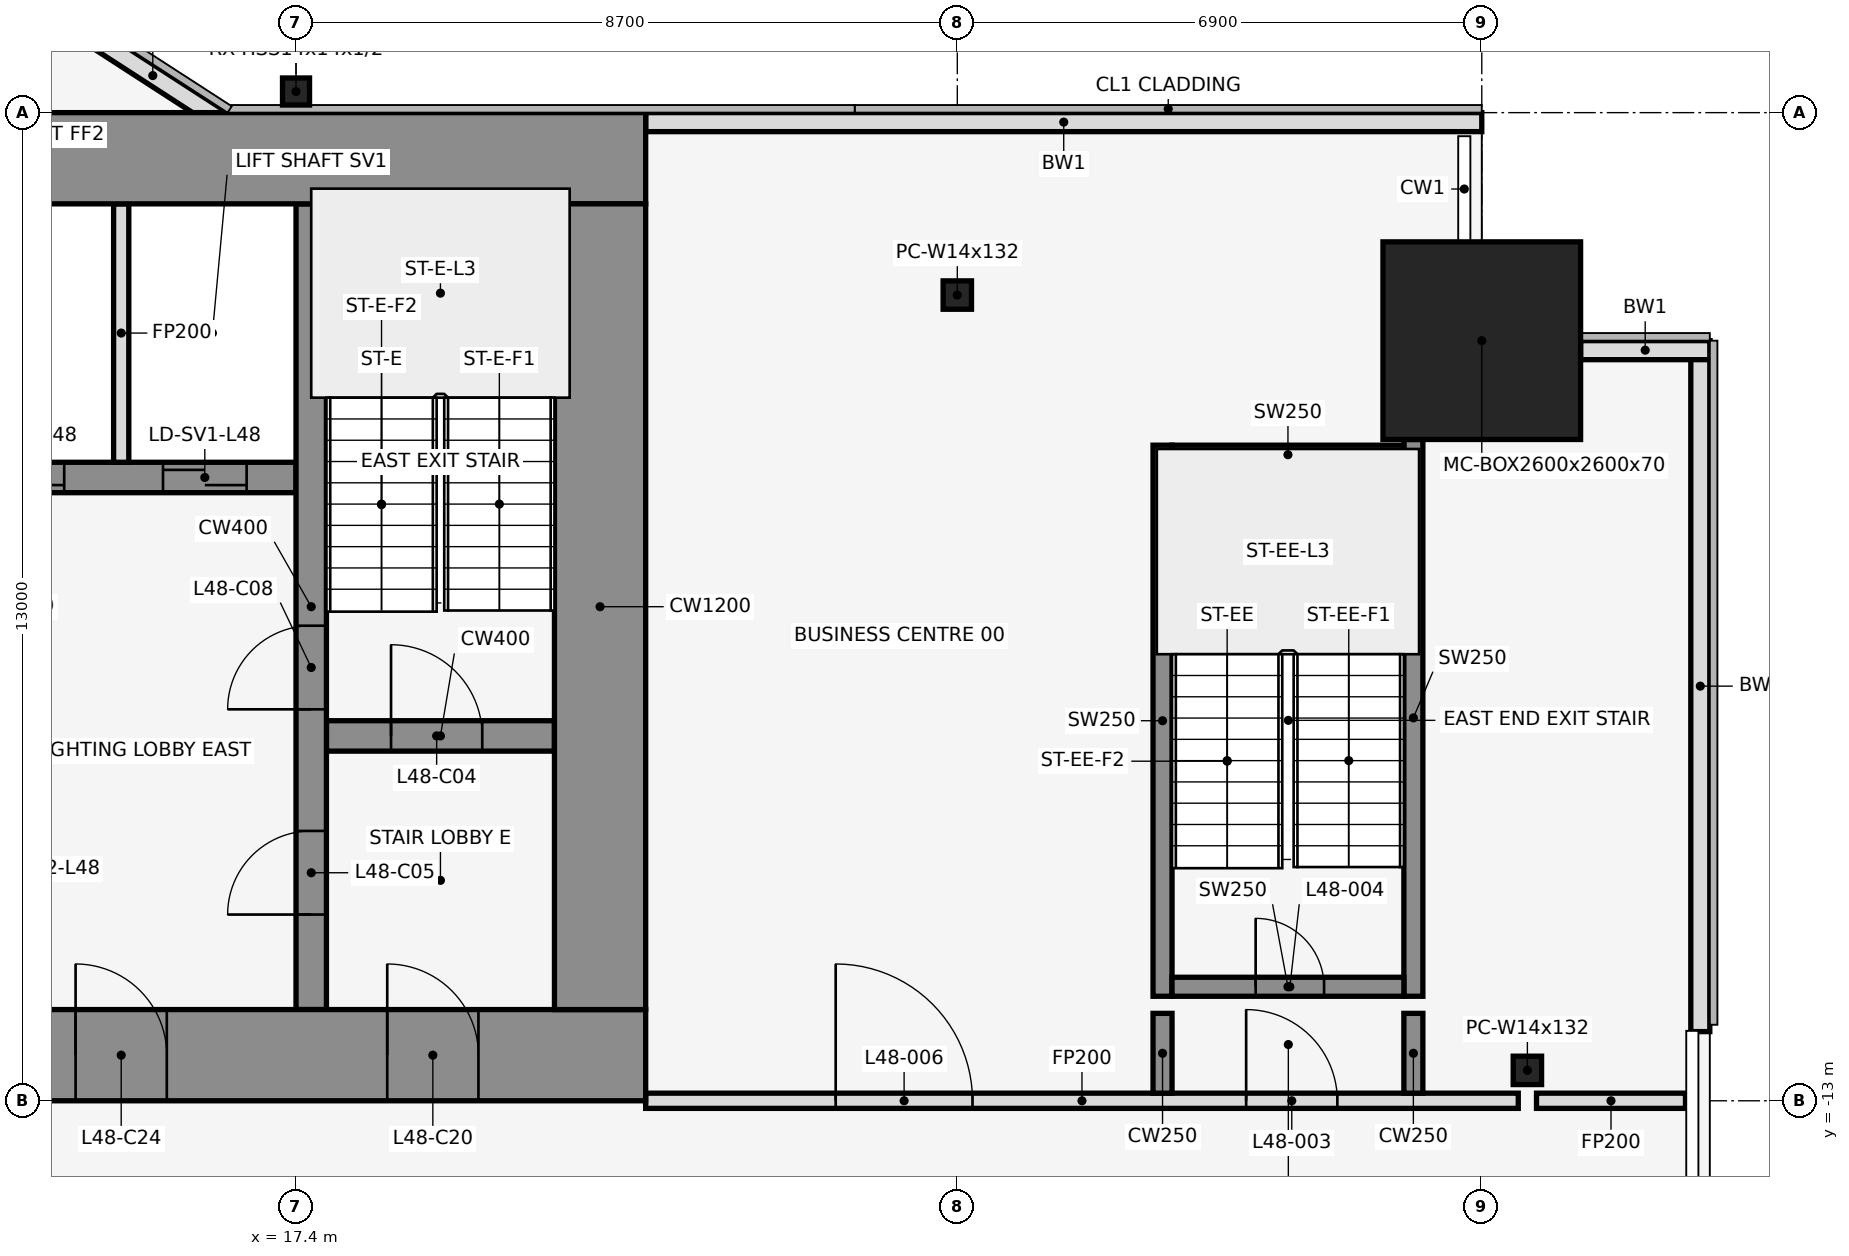
"""IFC4 building model, lengths in metres.
Left out: names, types, materials, properties, quantities, classifications, styles, units other than length and angle.
Written with IfcOpenShell. Run it as: python <this file> out.ifc"""

import sys

from ifc_helpers import new_model, si_unit, direction, frame, frame_2d, origin, origin_2d, place, context, subcontext, project, spatial, rectangle, hollow_rectangle, i_section, extrude, element, fill, save


model = new_model("IFC4")
c1 = context("Model", 3, precision=1e-05, world=origin(), true_north=direction((0.0, 1.0)))
c2 = subcontext(c1, "Body", "Model", "MODEL_VIEW")
j1 = project(units=[si_unit("LENGTHUNIT", "METRE"), si_unit("PLANEANGLEUNIT", "RADIAN")], contexts=[c1])
p1 = place(None, origin())
s1 = spatial("IfcSite", under=j1, at=p1, CompositionType="ELEMENT")
p2 = place(p1, origin())
s2 = spatial("IfcBuilding", under=s1, at=p2, CompositionType="ELEMENT")
p3 = place(p2, frame((0.0, 0.0, 215.5)))
s3 = spatial("IfcBuildingStorey", under=s2, at=p3, CompositionType="ELEMENT", Elevation=215.5)
p4 = place(p3, frame((26.1, -2.4, 0.0), z_axis=(0.0, 0.0, 1.0), x_axis=(1.0, 0.0, 0.0)))
e1 = element("IfcColumn", 1, at=p4, inside=s3, PredefinedType="COLUMN", context=c2, shape_type="SweptSolid", body=[
    extrude(i_section(OverallWidth=0.373, OverallDepth=0.373, WebThickness=0.016, FlangeThickness=0.026, at=origin_2d()), origin(), (0.0, 0.0, 1.0), 4.1),
])
p5 = place(p3, frame((33.0, -3.0, 0.0), z_axis=(0.0, 0.0, 1.0), x_axis=(1.0, 0.0, 0.0)))
e2 = element("IfcColumn", 2, at=p5, inside=s3, PredefinedType="COLUMN", context=c2, shape_type="SweptSolid", body=[
    extrude(hollow_rectangle(XDim=2.6, YDim=2.6, WallThickness=0.07, at=origin_2d()), origin(), (0.0, 0.0, 1.0), 4.1),
])
p6 = place(p3, frame((17.4, 0.278, 0.0), z_axis=(0.0, 0.0, 1.0), x_axis=(1.0, 0.0, 0.0)))
e3 = element("IfcColumn", 3, at=p6, inside=s3, PredefinedType="COLUMN", context=c2, shape_type="SweptSolid", body=[
    extrude(hollow_rectangle(XDim=0.356, YDim=0.356, WallThickness=0.012, at=origin_2d()), origin(), (0.0, 0.0, 1.0), 4.1),
])
p7 = place(p3, frame((33.6, -12.6, 0.0), z_axis=(0.0, 0.0, 1.0), x_axis=(1.0, 0.0, 0.0)))
e4 = element("IfcColumn", 4, at=p7, inside=s3, PredefinedType="COLUMN", context=c2, shape_type="SweptSolid", body=[
    extrude(i_section(OverallWidth=0.373, OverallDepth=0.373, WebThickness=0.016, FlangeThickness=0.026, at=origin_2d()), origin(), (0.0, 0.0, 1.0), 4.1),
])
p8 = place(p3, frame((33.0, -0.125, 0.0), z_axis=(0.0, 0.0, 1.0), x_axis=(-1.0, 0.0, 0.0)))
e5 = element("IfcWall", 5, at=p8, inside=s3, PredefinedType="STANDARD", context=c2, shape_type="SweptSolid", body=[
    extrude(rectangle(XDim=11.0, YDim=0.25, at=frame_2d((5.5, 0.0))), origin(), (0.0, 0.0, 1.0), 3.95),
])
p9 = place(p3, frame((16.432, -0.105, 0.0), z_axis=(0.0, 0.0, 1.0), x_axis=(-0.83981312244, 0.542875602121, 0.0)))
e6 = element("IfcWall", 6, at=p9, inside=s3, PredefinedType="STANDARD", context=c2, shape_type="SweptSolid", body=[
    extrude(rectangle(XDim=2.183, YDim=0.25, at=frame_2d((1.091, 0.0))), origin(), (0.0, 0.0, 1.0), 3.95),
])
p10 = place(p3, frame((35.875, -12.09, 0.0), z_axis=(0.0, 0.0, 1.0), x_axis=(0.0, 1.0, 0.0)))
e7 = element("IfcWall", 7, at=p10, inside=s3, PredefinedType="STANDARD", context=c2, shape_type="SweptSolid", body=[
    extrude(rectangle(XDim=9.09, YDim=0.25, at=frame_2d((4.545, 0.0))), origin(), (0.0, 0.0, 1.0), 3.95),
])
p11 = place(p3, frame((36.0, -3.125, 0.0), z_axis=(0.0, 0.0, 1.0), x_axis=(-1.0, 0.0, 0.0)))
e8 = element("IfcWall", 8, at=p11, inside=s3, PredefinedType="STANDARD", context=c2, shape_type="SweptSolid", body=[
    extrude(rectangle(XDim=1.7, YDim=0.25, at=frame_2d((0.85, 0.0))), origin(), (0.0, 0.0, 1.0), 3.95),
])
p12 = place(p3, frame((28.8, -11.625, 0.0), z_axis=(0.0, 0.0, 1.0), x_axis=(0.0, 1.0, 0.0)))
e9 = element("IfcWall", 9, at=p12, inside=s3, PredefinedType="SHEAR", context=c2, shape_type="SweptSolid", body=[
    extrude(rectangle(XDim=7.25, YDim=0.25, at=frame_2d((3.625, 0.0))), origin(), (0.0, 0.0, 1.0), 4.1),
])
p13 = place(p3, frame((32.1, -11.625, 0.0), z_axis=(0.0, 0.0, 1.0), x_axis=(0.0, 1.0, 0.0)))
e10 = element("IfcWall", 10, at=p13, inside=s3, PredefinedType="SHEAR", context=c2, shape_type="SweptSolid", body=[
    extrude(rectangle(XDim=7.325, YDim=0.25, at=frame_2d((3.663, 0.0))), origin(), (0.0, 0.0, 1.0), 4.1),
])
p14 = place(p3, frame((28.925, -11.5, 0.0), z_axis=(0.0, 0.0, 1.0), x_axis=(1.0, 0.0, 0.0)))
e11 = element("IfcWall", 11, at=p14, inside=s3, PredefinedType="SHEAR", context=c2, shape_type="SweptSolid", body=[
    extrude(rectangle(XDim=3.05, YDim=0.25, at=frame_2d((1.525, 0.0))), origin(), (0.0, 0.0, 1.0), 4.1),
])
p15 = place(p14, frame((1.1, 0.0, 0.0)))
e12 = element("IfcOpeningElement", 12, at=p15, cuts=e11, PredefinedType="OPENING", context=c2, shape_type="SweptSolid", body=[
    extrude(rectangle(XDim=0.9, YDim=2.1, at=frame_2d((0.45, 1.05))), frame((0.0, 0.137, 0.0), z_axis=(0.0, -1.0, 0.0), x_axis=(1.0, 0.0, 0.0)), (0.0, 0.0, 1.0), 0.274),
])
p16 = place(p3, frame((28.925, -4.5, 0.0), z_axis=(0.0, 0.0, 1.0), x_axis=(1.0, 0.0, 0.0)))
e13 = element("IfcWall", 13, at=p16, inside=s3, PredefinedType="SHEAR", context=c2, shape_type="SweptSolid", body=[
    extrude(rectangle(XDim=3.05, YDim=0.25, at=frame_2d((1.525, 0.0))), origin(), (0.0, 0.0, 1.0), 4.1),
])
p17 = place(p3, frame((22.0, -13.0, 0.0), z_axis=(0.0, 0.0, 1.0), x_axis=(1.0, 0.0, 0.0)))
e14 = element("IfcWall", 14, at=p17, inside=s3, PredefinedType="PARTITIONING", context=c2, shape_type="SweptSolid", body=[
    extrude(rectangle(XDim=11.48, YDim=0.2, at=frame_2d((5.74, 0.0))), origin(), (0.0, 0.0, 1.0), 2.84),
])
p18 = place(p17, frame((7.9, 0.0, 0.0)))
e15 = element("IfcOpeningElement", 15, at=p18, cuts=e14, PredefinedType="OPENING", context=c2, shape_type="SweptSolid", body=[
    extrude(rectangle(XDim=1.2, YDim=2.1, at=frame_2d((0.6, 1.05))), frame((0.0, 0.112, 0.0), z_axis=(0.0, -1.0, 0.0), x_axis=(1.0, 0.0, 0.0)), (0.0, 0.0, 1.0), 0.224),
])
p19 = place(p17, frame((2.5, 0.0, 0.0)))
e16 = element("IfcOpeningElement", 16, at=p19, cuts=e14, PredefinedType="OPENING", context=c2, shape_type="SweptSolid", body=[
    extrude(rectangle(XDim=1.8, YDim=2.1, at=frame_2d((0.9, 1.05))), frame((0.0, 0.112, 0.0), z_axis=(0.0, -1.0, 0.0), x_axis=(1.0, 0.0, 0.0)), (0.0, 0.0, 1.0), 0.224),
])
p20 = place(p3, frame((33.72, -13.0, 0.0), z_axis=(0.0, 0.0, 1.0), x_axis=(1.0, 0.0, 0.0)))
e17 = element("IfcWall", 17, at=p20, inside=s3, PredefinedType="PARTITIONING", context=c2, shape_type="SweptSolid", body=[
    extrude(rectangle(XDim=1.96, YDim=0.2, at=frame_2d((0.98, 0.0))), origin(), (0.0, 0.0, 1.0), 2.84),
])
for number, where, z_axis, x_axis in (
    (18, (28.8, -12.9, 0.0), (0.0, 0.0, 1.0), (0.0, 1.0, 0.0)),
    (19, (32.1, -12.9, 0.0), (0.0, 0.0, 1.0), (0.0, 1.0, 0.0)),
):
    element("IfcWall", number, at=place(p3, frame(where, z_axis=z_axis, x_axis=x_axis)), inside=s3, PredefinedType="SHEAR", context=c2, shape_type="SweptSolid", body=[
        extrude(rectangle(XDim=1.05, YDim=0.25, at=frame_2d((0.525, 0.0))), origin(), (0.0, 0.0, 1.0), 4.1),
    ])
p21 = place(p3, frame((17.8, -8.2, 0.0), z_axis=(0.0, 0.0, 1.0), x_axis=(1.0, 0.0, 0.0)))
e20 = element("IfcWall", 20, at=p21, inside=s3, PredefinedType="SHEAR", context=c2, shape_type="SweptSolid", body=[
    extrude(rectangle(XDim=3.0, YDim=0.4, at=frame_2d((1.5, 0.0))), origin(), (0.0, 0.0, 1.0), 4.1),
])
p22 = place(p21, frame((0.85, 0.0, 0.0)))
e21 = element("IfcOpeningElement", 21, at=p22, cuts=e20, PredefinedType="OPENING", context=c2, shape_type="SweptSolid", body=[
    extrude(rectangle(XDim=1.2, YDim=2.1, at=frame_2d((0.6, 1.05))), frame((0.0, 0.212, 0.0), z_axis=(0.0, -1.0, 0.0), x_axis=(1.0, 0.0, 0.0)), (0.0, 0.0, 1.0), 0.424),
])
p23 = place(p3, frame((3.8, -4.8, 0.0), z_axis=(0.0, 0.0, 1.0), x_axis=(1.0, 0.0, 0.0)))
e22 = element("IfcWall", 22, at=p23, inside=s3, PredefinedType="SHEAR", context=c2, shape_type="SweptSolid", body=[
    extrude(rectangle(XDim=13.6, YDim=0.4, at=frame_2d((6.8, 0.0))), origin(), (0.0, 0.0, 1.0), 4.1),
])
p24 = place(p23, frame((9.45, 0.0, 0.0)))
e23 = element("IfcOpeningElement", 23, at=p24, cuts=e22, PredefinedType="OPENING", context=c2, shape_type="SweptSolid", body=[
    extrude(rectangle(XDim=1.1, YDim=2.1, at=frame_2d((0.55, 1.05))), frame((0.0, 0.212, 0.0), z_axis=(0.0, -1.0, 0.0), x_axis=(1.0, 0.0, 0.0)), (0.0, 0.0, 1.0), 0.424),
])
p25 = place(p23, frame((11.85, 0.0, 0.0)))
e24 = element("IfcOpeningElement", 24, at=p25, cuts=e22, PredefinedType="OPENING", context=c2, shape_type="SweptSolid", body=[
    extrude(rectangle(XDim=1.1, YDim=2.1, at=frame_2d((0.55, 1.05))), frame((0.0, 0.212, 0.0), z_axis=(0.0, -1.0, 0.0), x_axis=(1.0, 0.0, 0.0)), (0.0, 0.0, 1.0), 0.424),
])
p26 = place(p23, frame((2.45, 0.0, 0.0)))
e25 = element("IfcOpeningElement", 25, at=p26, cuts=e22, PredefinedType="OPENING", context=c2, shape_type="SweptSolid", body=[
    extrude(rectangle(XDim=0.9, YDim=2.1, at=frame_2d((0.45, 1.05))), frame((0.0, 0.212, 0.0), z_axis=(0.0, -1.0, 0.0), x_axis=(1.0, 0.0, 0.0)), (0.0, 0.0, 1.0), 0.424),
])
p27 = place(p23, frame((6.85, 0.0, 0.0)))
e26 = element("IfcOpeningElement", 26, at=p27, cuts=e22, PredefinedType="OPENING", context=c2, shape_type="SweptSolid", body=[
    extrude(rectangle(XDim=0.9, YDim=2.1, at=frame_2d((0.45, 1.05))), frame((0.0, 0.212, 0.0), z_axis=(0.0, -1.0, 0.0), x_axis=(1.0, 0.0, 0.0)), (0.0, 0.0, 1.0), 0.424),
])
p28 = place(p3, frame((15.1, -4.6, 0.0), z_axis=(0.0, 0.0, 1.0), x_axis=(0.0, 1.0, 0.0)))
e27 = element("IfcWall", 27, at=p28, inside=s3, PredefinedType="PARTITIONING", context=c2, shape_type="SweptSolid", body=[
    extrude(rectangle(XDim=3.4, YDim=0.2, at=frame_2d((1.7, 0.0))), origin(), (0.0, 0.0, 1.0), 2.84),
])
p29 = place(p3, frame((17.6, -11.8, 0.0), z_axis=(0.0, 0.0, 1.0), x_axis=(0.0, 1.0, 0.0)))
e28 = element("IfcWall", 28, at=p29, inside=s3, PredefinedType="SHEAR", context=c2, shape_type="SweptSolid", body=[
    extrude(rectangle(XDim=10.6, YDim=0.4, at=frame_2d((5.3, 0.0))), origin(), (0.0, 0.0, 1.0), 4.1),
])
p30 = place(p29, frame((1.25, 0.0, 0.0)))
e29 = element("IfcOpeningElement", 29, at=p30, cuts=e28, PredefinedType="OPENING", context=c2, shape_type="SweptSolid", body=[
    extrude(rectangle(XDim=1.1, YDim=2.1, at=frame_2d((0.55, 1.05))), frame((0.0, 0.212, 0.0), z_axis=(0.0, -1.0, 0.0), x_axis=(1.0, 0.0, 0.0)), (0.0, 0.0, 1.0), 0.424),
])
p31 = place(p29, frame((3.95, 0.0, 0.0)))
e30 = element("IfcOpeningElement", 30, at=p31, cuts=e28, PredefinedType="OPENING", context=c2, shape_type="SweptSolid", body=[
    extrude(rectangle(XDim=1.1, YDim=2.1, at=frame_2d((0.55, 1.05))), frame((0.0, 0.212, 0.0), z_axis=(0.0, -1.0, 0.0), x_axis=(1.0, 0.0, 0.0)), (0.0, 0.0, 1.0), 0.424),
])
p32 = place(p3, frame((-22.0, -0.6, 0.0), z_axis=(0.0, 0.0, 1.0), x_axis=(1.0, 0.0, 0.0)))
e31 = element("IfcWall", 31, at=p32, inside=s3, PredefinedType="SHEAR", context=c2, shape_type="SweptSolid", body=[
    extrude(rectangle(XDim=44.0, YDim=1.2, at=frame_2d((22.0, 0.0))), origin(), (0.0, 0.0, 1.0), 4.1),
])
p33 = place(p32, frame((18.55, 0.0, 0.0)))
e32 = element("IfcOpeningElement", 32, at=p33, cuts=e31, PredefinedType="OPENING", context=c2, shape_type="SweptSolid", body=[
    extrude(rectangle(XDim=0.9, YDim=2.1, at=frame_2d((0.45, 1.05))), frame((0.0, 0.612, 0.0), z_axis=(0.0, -1.0, 0.0), x_axis=(1.0, 0.0, 0.0)), (0.0, 0.0, 1.0), 1.224),
])
p34 = place(p32, frame((24.55, 0.0, 0.0)))
e33 = element("IfcOpeningElement", 33, at=p34, cuts=e31, PredefinedType="OPENING", context=c2, shape_type="SweptSolid", body=[
    extrude(rectangle(XDim=0.9, YDim=2.1, at=frame_2d((0.45, 1.05))), frame((0.0, 0.612, 0.0), z_axis=(0.0, -1.0, 0.0), x_axis=(1.0, 0.0, 0.0)), (0.0, 0.0, 1.0), 1.224),
])
p35 = place(p3, frame((-22.0, -12.4, 0.0), z_axis=(0.0, 0.0, 1.0), x_axis=(1.0, 0.0, 0.0)))
e34 = element("IfcWall", 34, at=p35, inside=s3, PredefinedType="SHEAR", context=c2, shape_type="SweptSolid", body=[
    extrude(rectangle(XDim=44.0, YDim=1.2, at=frame_2d((22.0, 0.0))), origin(), (0.0, 0.0, 1.0), 4.1),
])
p36 = place(p35, frame((2.2, 0.0, 0.0)))
e35 = element("IfcOpeningElement", 35, at=p36, cuts=e34, PredefinedType="OPENING", context=c2, shape_type="SweptSolid", body=[
    extrude(rectangle(XDim=1.2, YDim=2.1, at=frame_2d((0.6, 1.05))), frame((0.0, 0.612, 0.0), z_axis=(0.0, -1.0, 0.0), x_axis=(1.0, 0.0, 0.0)), (0.0, 0.0, 1.0), 1.224),
])
p37 = place(p35, frame((21.4, 0.0, 0.0)))
e36 = element("IfcOpeningElement", 36, at=p37, cuts=e34, PredefinedType="OPENING", context=c2, shape_type="SweptSolid", body=[
    extrude(rectangle(XDim=1.2, YDim=2.1, at=frame_2d((0.6, 1.05))), frame((0.0, 0.612, 0.0), z_axis=(0.0, -1.0, 0.0), x_axis=(1.0, 0.0, 0.0)), (0.0, 0.0, 1.0), 1.224),
])
p38 = place(p35, frame((40.6, 0.0, 0.0)))
e37 = element("IfcOpeningElement", 37, at=p38, cuts=e34, PredefinedType="OPENING", context=c2, shape_type="SweptSolid", body=[
    extrude(rectangle(XDim=1.2, YDim=2.1, at=frame_2d((0.6, 1.05))), frame((0.0, 0.612, 0.0), z_axis=(0.0, -1.0, 0.0), x_axis=(1.0, 0.0, 0.0)), (0.0, 0.0, 1.0), 1.224),
])
p39 = place(p35, frame((16.0, 0.0, 0.0)))
e38 = element("IfcOpeningElement", 38, at=p39, cuts=e34, PredefinedType="OPENING", context=c2, shape_type="SweptSolid", body=[
    extrude(rectangle(XDim=1.8, YDim=2.1, at=frame_2d((0.9, 1.05))), frame((0.0, 0.612, 0.0), z_axis=(0.0, -1.0, 0.0), x_axis=(1.0, 0.0, 0.0)), (0.0, 0.0, 1.0), 1.224),
])
p40 = place(p35, frame((6.3, 0.0, 0.0)))
e39 = element("IfcOpeningElement", 39, at=p40, cuts=e34, PredefinedType="OPENING", context=c2, shape_type="SweptSolid", body=[
    extrude(rectangle(XDim=1.2, YDim=2.1, at=frame_2d((0.6, 1.05))), frame((0.0, 0.612, 0.0), z_axis=(0.0, -1.0, 0.0), x_axis=(1.0, 0.0, 0.0)), (0.0, 0.0, 1.0), 1.224),
])
p41 = place(p35, frame((26.2, 0.0, 0.0)))
e40 = element("IfcOpeningElement", 40, at=p41, cuts=e34, PredefinedType="OPENING", context=c2, shape_type="SweptSolid", body=[
    extrude(rectangle(XDim=1.8, YDim=2.1, at=frame_2d((0.9, 1.05))), frame((0.0, 0.612, 0.0), z_axis=(0.0, -1.0, 0.0), x_axis=(1.0, 0.0, 0.0)), (0.0, 0.0, 1.0), 1.224),
])
p42 = place(p35, frame((36.5, 0.0, 0.0)))
e41 = element("IfcOpeningElement", 41, at=p42, cuts=e34, PredefinedType="OPENING", context=c2, shape_type="SweptSolid", body=[
    extrude(rectangle(XDim=1.2, YDim=2.1, at=frame_2d((0.6, 1.05))), frame((0.0, 0.612, 0.0), z_axis=(0.0, -1.0, 0.0), x_axis=(1.0, 0.0, 0.0)), (0.0, 0.0, 1.0), 1.224),
])
p43 = place(p3, frame((21.4, -11.8, 0.0), z_axis=(0.0, 0.0, 1.0), x_axis=(0.0, 1.0, 0.0)))
e42 = element("IfcWall", 42, at=p43, inside=s3, PredefinedType="SHEAR", context=c2, shape_type="SweptSolid", body=[
    extrude(rectangle(XDim=10.6, YDim=1.2, at=frame_2d((5.3, 0.0))), origin(), (0.0, 0.0, 1.0), 4.1),
])
p44 = place(p18, origin())
e43 = element("IfcDoor", 43, at=p44, inside=s3, OperationType="SINGLE_SWING_RIGHT", PredefinedType="DOOR", context=c2, shape_type="SweptSolid", body=[
    extrude(rectangle(XDim=1.2, YDim=2.1, at=frame_2d((0.6, 1.05))), frame((0.0, 0.025, 0.0), z_axis=(0.0, -1.0, 0.0), x_axis=(1.0, 0.0, 0.0)), (0.0, 0.0, 1.0), 0.05),
])
fill(e15, e43)
p45 = place(p15, origin())
e44 = element("IfcDoor", 44, at=p45, inside=s3, OperationType="SINGLE_SWING_LEFT", PredefinedType="DOOR", context=c2, shape_type="SweptSolid", body=[
    extrude(rectangle(XDim=0.9, YDim=2.1, at=frame_2d((0.45, 1.05))), frame((0.0, 0.025, 0.0), z_axis=(0.0, -1.0, 0.0), x_axis=(1.0, 0.0, 0.0)), (0.0, 0.0, 1.0), 0.05),
])
fill(e12, e44)
p46 = place(p19, origin())
e45 = element("IfcDoor", 45, at=p46, inside=s3, OperationType="SINGLE_SWING_LEFT", PredefinedType="DOOR", context=c2, shape_type="SweptSolid", body=[
    extrude(rectangle(XDim=1.8, YDim=2.1, at=frame_2d((0.9, 1.05))), frame((0.0, 0.025, 0.0), z_axis=(0.0, -1.0, 0.0), x_axis=(1.0, 0.0, 0.0)), (0.0, 0.0, 1.0), 0.05),
])
fill(e16, e45)
p47 = place(p22, origin())
e46 = element("IfcDoor", 46, at=p47, inside=s3, OperationType="SINGLE_SWING_RIGHT", PredefinedType="DOOR", context=c2, shape_type="SweptSolid", body=[
    extrude(rectangle(XDim=1.2, YDim=2.1, at=frame_2d((0.6, 1.05))), frame((0.0, 0.025, 0.0), z_axis=(0.0, -1.0, 0.0), x_axis=(1.0, 0.0, 0.0)), (0.0, 0.0, 1.0), 0.05),
])
fill(e21, e46)
p48 = place(p30, origin())
e47 = element("IfcDoor", 47, at=p48, inside=s3, OperationType="SINGLE_SWING_LEFT", PredefinedType="DOOR", context=c2, shape_type="SweptSolid", body=[
    extrude(rectangle(XDim=1.1, YDim=2.1, at=frame_2d((0.55, 1.05))), frame((0.0, 0.025, 0.0), z_axis=(0.0, -1.0, 0.0), x_axis=(1.0, 0.0, 0.0)), (0.0, 0.0, 1.0), 0.05),
])
fill(e29, e47)
p49 = place(p24, origin())
e48 = element("IfcDoor", 48, at=p49, inside=s3, OperationType="DOUBLE_DOOR_SLIDING", PredefinedType="DOOR", context=c2, shape_type="SweptSolid", body=[
    extrude(rectangle(XDim=1.1, YDim=2.1, at=frame_2d((0.55, 1.05))), frame((0.0, 0.025, 0.0), z_axis=(0.0, -1.0, 0.0), x_axis=(1.0, 0.0, 0.0)), (0.0, 0.0, 1.0), 0.05),
])
fill(e23, e48)
p50 = place(p25, origin())
e49 = element("IfcDoor", 49, at=p50, inside=s3, OperationType="DOUBLE_DOOR_SLIDING", PredefinedType="DOOR", context=c2, shape_type="SweptSolid", body=[
    extrude(rectangle(XDim=1.1, YDim=2.1, at=frame_2d((0.55, 1.05))), frame((0.0, 0.025, 0.0), z_axis=(0.0, -1.0, 0.0), x_axis=(1.0, 0.0, 0.0)), (0.0, 0.0, 1.0), 0.05),
])
fill(e24, e49)
p51 = place(p31, origin())
e50 = element("IfcDoor", 50, at=p51, inside=s3, OperationType="SINGLE_SWING_RIGHT", PredefinedType="DOOR", context=c2, shape_type="SweptSolid", body=[
    extrude(rectangle(XDim=1.1, YDim=2.1, at=frame_2d((0.55, 1.05))), frame((0.0, 0.025, 0.0), z_axis=(0.0, -1.0, 0.0), x_axis=(1.0, 0.0, 0.0)), (0.0, 0.0, 1.0), 0.05),
])
fill(e30, e50)
p52 = place(p38, frame((1.2, 0.0, 0.0), z_axis=(0.0, 0.0, 1.0), x_axis=(-1.0, 0.0, 0.0)))
e51 = element("IfcDoor", 51, at=p52, inside=s3, OperationType="SINGLE_SWING_RIGHT", PredefinedType="DOOR", context=c2, shape_type="SweptSolid", body=[
    extrude(rectangle(XDim=1.2, YDim=2.1, at=frame_2d((0.6, 1.05))), frame((0.0, 0.025, 0.0), z_axis=(0.0, -1.0, 0.0), x_axis=(1.0, 0.0, 0.0)), (0.0, 0.0, 1.0), 0.05),
])
fill(e37, e51)
p53 = place(p42, frame((1.2, 0.0, 0.0), z_axis=(0.0, 0.0, 1.0), x_axis=(-1.0, 0.0, 0.0)))
e52 = element("IfcDoor", 52, at=p53, inside=s3, OperationType="SINGLE_SWING_RIGHT", PredefinedType="DOOR", context=c2, shape_type="SweptSolid", body=[
    extrude(rectangle(XDim=1.2, YDim=2.1, at=frame_2d((0.6, 1.05))), frame((0.0, 0.025, 0.0), z_axis=(0.0, -1.0, 0.0), x_axis=(1.0, 0.0, 0.0)), (0.0, 0.0, 1.0), 0.05),
])
fill(e41, e52)
save(model, sys.argv[1])
